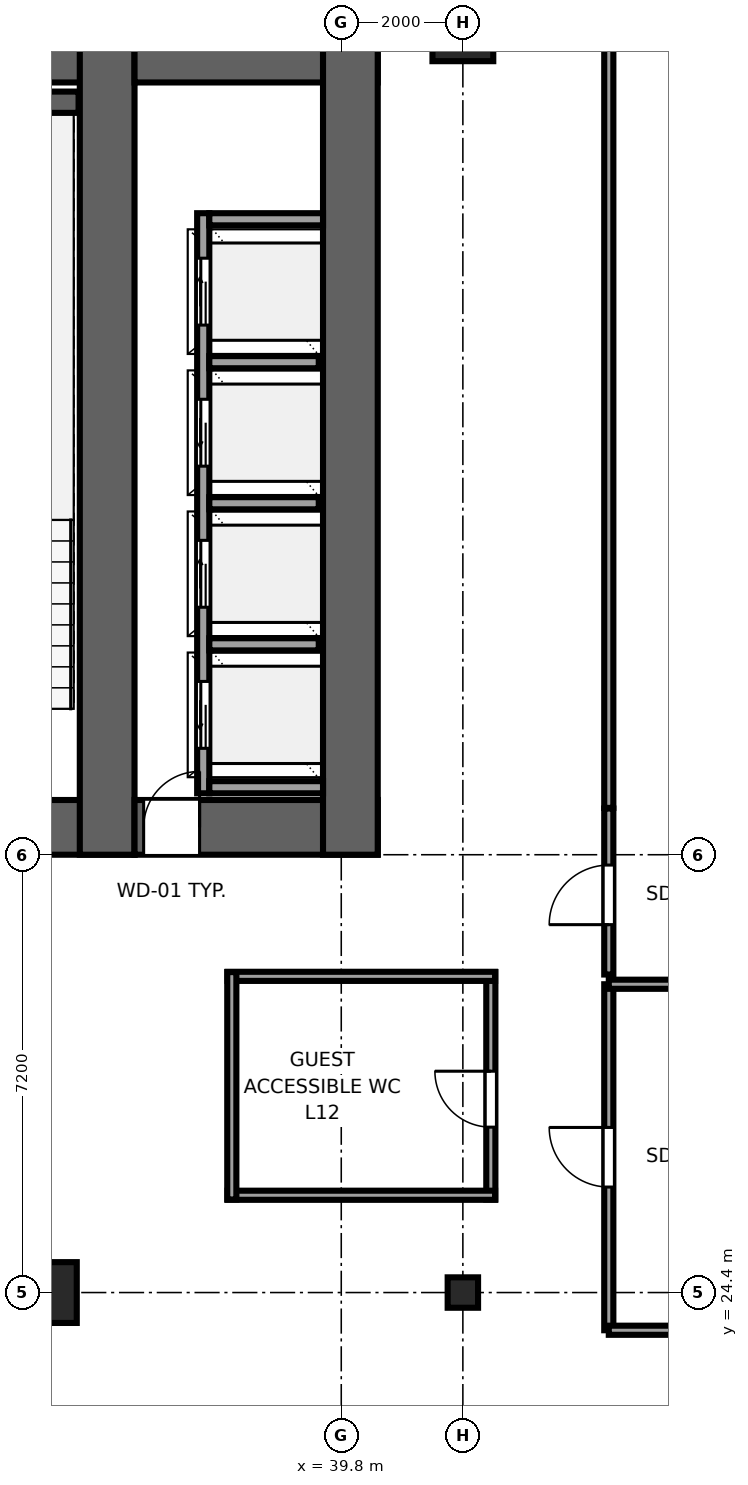
"""IFC4 building model, lengths in metres.
Left out: names, types, materials, properties, quantities, classifications, styles, units other than length and angle.
Written with IfcOpenShell. Run it as: python <this file> out.ifc"""

import sys

from ifc_helpers import new_model, si_unit, direction, frame, frame_2d, origin, origin_2d, place, context, subcontext, project, spatial, rectangle, i_section, extrude, source, transform, mapped, element, fill, save


model = new_model("IFC4")
c1 = context("Model", 3, precision=1e-05, world=origin(), true_north=direction((0.0, 1.0)))
c2 = subcontext(c1, "Body", "Model", "MODEL_VIEW")
j1 = project(units=[si_unit("LENGTHUNIT", "METRE"), si_unit("PLANEANGLEUNIT", "RADIAN")], contexts=[c1])
p1 = place(None, origin())
s1 = spatial("IfcSite", under=j1, at=p1, CompositionType="ELEMENT")
p2 = place(p1, origin())
s2 = spatial("IfcBuilding", under=s1, at=p2, CompositionType="ELEMENT")
p3 = place(p2, frame((0.0, 0.0, 53.3)))
s3 = spatial("IfcBuildingStorey", under=s2, at=p3, CompositionType="ELEMENT", Elevation=53.3)
p4 = place(p3, frame((9.6, 32.05, 0.0), z_axis=(0.0, 0.0, 1.0), x_axis=(1.0, 0.0, 0.0)))
e1 = element("IfcWall", 1, at=p4, inside=s3, PredefinedType="SHEAR", context=c2, shape_type="SweptSolid", body=[
    extrude(rectangle(XDim=26.8, YDim=0.9, at=frame_2d((13.4, 0.0))), origin(), (0.0, 0.0, 1.0), 3.55),
])
p5 = place(p4, frame((7.85, 0.0, 0.0), z_axis=(0.0, 0.0, 1.0), x_axis=(-1.0, 0.0, 0.0)))
e2 = element("IfcOpeningElement", 2, at=p5, cuts=e1, PredefinedType="OPENING", context=c2, shape_type="SweptSolid", body=[
    extrude(rectangle(XDim=1.5, YDim=2.04, at=frame_2d((0.75, 1.02))), frame((0.0, 0.46, 0.0), z_axis=(0.0, -1.0, 0.0), x_axis=(1.0, 0.0, 0.0)), (0.0, 0.0, 1.0), 0.92),
])
p6 = place(p4, frame((14.15, 0.0, 0.0), z_axis=(0.0, 0.0, 1.0), x_axis=(-1.0, 0.0, 0.0)))
e3 = element("IfcOpeningElement", 3, at=p6, cuts=e1, PredefinedType="OPENING", context=c2, shape_type="SweptSolid", body=[
    extrude(rectangle(XDim=1.5, YDim=2.04, at=frame_2d((0.75, 1.02))), frame((0.0, 0.46, 0.0), z_axis=(0.0, -1.0, 0.0), x_axis=(1.0, 0.0, 0.0)), (0.0, 0.0, 1.0), 0.92),
])
p7 = place(p4, frame((20.45, 0.0, 0.0), z_axis=(0.0, 0.0, 1.0), x_axis=(-1.0, 0.0, 0.0)))
e4 = element("IfcOpeningElement", 4, at=p7, cuts=e1, PredefinedType="OPENING", context=c2, shape_type="SweptSolid", body=[
    extrude(rectangle(XDim=1.5, YDim=2.04, at=frame_2d((0.75, 1.02))), frame((0.0, 0.46, 0.0), z_axis=(0.0, -1.0, 0.0), x_axis=(1.0, 0.0, 0.0)), (0.0, 0.0, 1.0), 0.92),
])
p8 = place(p3, frame((9.6, 44.75, 0.0), z_axis=(0.0, 0.0, 1.0), x_axis=(1.0, 0.0, 0.0)))
e5 = element("IfcWall", 5, at=p8, inside=s3, PredefinedType="SHEAR", context=c2, shape_type="SweptSolid", body=[
    extrude(rectangle(XDim=26.8, YDim=0.9, at=frame_2d((13.4, 0.0))), origin(), (0.0, 0.0, 1.0), 3.55),
])
p9 = place(p3, frame((35.95, 31.6, 0.0), z_axis=(0.0, 0.0, 1.0), x_axis=(0.0, 1.0, 0.0)))
e6 = element("IfcWall", 6, at=p9, inside=s3, PredefinedType="SHEAR", context=c2, shape_type="SweptSolid", body=[
    extrude(rectangle(XDim=13.6, YDim=0.9, at=frame_2d((6.8, 0.0))), origin(), (0.0, 0.0, 1.0), 3.55),
])
p10 = place(p3, frame((36.4, 32.05, 0.0), z_axis=(0.0, 0.0, 1.0), x_axis=(1.0, 0.0, 0.0)))
e7 = element("IfcWall", 7, at=p10, inside=s3, PredefinedType="SHEAR", context=c2, shape_type="SweptSolid", body=[
    extrude(rectangle(XDim=4.0, YDim=0.9, at=frame_2d((2.0, 0.0))), origin(), (0.0, 0.0, 1.0), 3.55),
])
p11 = place(p10, frame((1.07, 0.0, 0.0), z_axis=(0.0, 0.0, 1.0), x_axis=(-1.0, 0.0, 0.0)))
e8 = element("IfcOpeningElement", 8, at=p11, cuts=e7, PredefinedType="OPENING", context=c2, shape_type="SweptSolid", body=[
    extrude(rectangle(XDim=0.92, YDim=2.01, at=frame_2d((0.46, 1.005))), frame((0.0, 0.46, 0.0), z_axis=(0.0, -1.0, 0.0), x_axis=(1.0, 0.0, 0.0)), (0.0, 0.0, 1.0), 0.92),
])
p12 = place(p3, frame((36.4, 44.75, 0.0), z_axis=(0.0, 0.0, 1.0), x_axis=(1.0, 0.0, 0.0)))
e9 = element("IfcWall", 9, at=p12, inside=s3, PredefinedType="SHEAR", context=c2, shape_type="SweptSolid", body=[
    extrude(rectangle(XDim=4.0, YDim=0.9, at=frame_2d((2.0, 0.0))), origin(), (0.0, 0.0, 1.0), 3.55),
])
p13 = place(p3, frame((39.95, 31.6, 0.0), z_axis=(0.0, 0.0, 1.0), x_axis=(0.0, 1.0, 0.0)))
e10 = element("IfcWall", 10, at=p13, inside=s3, PredefinedType="SHEAR", context=c2, shape_type="SweptSolid", body=[
    extrude(rectangle(XDim=13.6, YDim=0.9, at=frame_2d((6.8, 0.0))), origin(), (0.0, 0.0, 1.0), 3.55),
])
p14 = place(p3, frame((31.88, 43.975, 0.0), z_axis=(0.0, 0.0, 1.0), x_axis=(1.0, 0.0, 0.0)))
e11 = element("IfcWall", 11, at=p14, inside=s3, PredefinedType="SHEAR", context=c2, shape_type="SweptSolid", body=[
    extrude(rectangle(XDim=3.6, YDim=0.35, at=frame_2d((1.8, 0.0))), origin(), (0.0, 0.0, 1.0), 3.55),
])
m1 = source(origin(), c2, "Body", "SweptSolid", [
    extrude(rectangle(XDim=1.0, YDim=1.0, at=origin_2d()), origin(), (0.0, 0.0, 1.0), 3.55),
])
p15 = place(p3, frame((34.95, 24.4, 0.0), z_axis=(0.0, 0.0, 1.0), x_axis=(1.0, 0.0, 0.0)))
e12 = element("IfcColumn", 12, at=p15, inside=s3, PredefinedType="COLUMN", context=c2, shape_type="MappedRepresentation", body=[
    mapped(m1, transform((0.0, 0.0, 0.0), x_axis=(1.0, 0.0, 0.0), y_axis=(0.0, 1.0, 0.0), z_axis=(0.0, 0.0, 1.0), scale=1.0)),
])
m2 = source(origin(), c2, "Body", "SweptSolid", [
    extrude(i_section(OverallWidth=0.5, OverallDepth=0.5, WebThickness=0.028, FlangeThickness=0.045, at=origin_2d()), origin(), (0.0, 0.0, 1.0), 3.55),
])
p16 = place(p3, frame((41.8, 24.4, 0.0), z_axis=(0.0, 0.0, 1.0), x_axis=(1.0, 0.0, 0.0)))
e13 = element("IfcColumn", 13, at=p16, inside=s3, PredefinedType="COLUMN", context=c2, shape_type="MappedRepresentation", body=[
    mapped(m2, transform((0.0, 0.0, 0.0), x_axis=(1.0, 0.0, 0.0), y_axis=(0.0, 1.0, 0.0), z_axis=(0.0, 0.0, 1.0), scale=1.0)),
])
p17 = place(p3, frame((41.8, 45.15, 0.0), z_axis=(0.0, 0.0, 1.0), x_axis=(1.0, 0.0, 0.0)))
e14 = element("IfcColumn", 14, at=p17, inside=s3, PredefinedType="COLUMN", context=c2, shape_type="MappedRepresentation", body=[
    mapped(m1, transform((0.0, 0.0, 0.0), x_axis=(1.0, 0.0, 0.0), y_axis=(0.0, 1.0, 0.0), z_axis=(0.0, 0.0, 1.0), scale=1.0)),
])
p18 = place(p3, frame((37.53, 32.61, 0.0), z_axis=(0.0, 0.0, 1.0), x_axis=(0.0, 1.0, 0.0)))
e15 = element("IfcWall", 15, at=p18, inside=s3, PredefinedType="SOLIDWALL", context=c2, shape_type="SweptSolid", body=[
    extrude(rectangle(XDim=9.54, YDim=0.2, at=frame_2d((4.77, 0.0))), origin(), (0.0, 0.0, 1.0), 3.37),
])
p19 = place(p18, frame((0.74, 0.0, 0.0)))
e16 = element("IfcOpeningElement", 16, at=p19, cuts=e15, PredefinedType="OPENING", context=c2, shape_type="SweptSolid", body=[
    extrude(rectangle(XDim=1.1, YDim=2.12, at=frame_2d((0.55, 1.06))), frame((0.0, 0.11, 0.0), z_axis=(0.0, -1.0, 0.0), x_axis=(1.0, 0.0, 0.0)), (0.0, 0.0, 1.0), 0.22),
])
p20 = place(p18, frame((3.06, 0.0, 0.0)))
e17 = element("IfcOpeningElement", 17, at=p20, cuts=e15, PredefinedType="OPENING", context=c2, shape_type="SweptSolid", body=[
    extrude(rectangle(XDim=1.1, YDim=2.12, at=frame_2d((0.55, 1.06))), frame((0.0, 0.11, 0.0), z_axis=(0.0, -1.0, 0.0), x_axis=(1.0, 0.0, 0.0)), (0.0, 0.0, 1.0), 0.22),
])
p21 = place(p18, frame((5.38, 0.0, 0.0)))
e18 = element("IfcOpeningElement", 18, at=p21, cuts=e15, PredefinedType="OPENING", context=c2, shape_type="SweptSolid", body=[
    extrude(rectangle(XDim=1.1, YDim=2.12, at=frame_2d((0.55, 1.06))), frame((0.0, 0.11, 0.0), z_axis=(0.0, -1.0, 0.0), x_axis=(1.0, 0.0, 0.0)), (0.0, 0.0, 1.0), 0.22),
])
p22 = place(p18, frame((7.7, 0.0, 0.0)))
e19 = element("IfcOpeningElement", 19, at=p22, cuts=e15, PredefinedType="OPENING", context=c2, shape_type="SweptSolid", body=[
    extrude(rectangle(XDim=1.1, YDim=2.12, at=frame_2d((0.55, 1.06))), frame((0.0, 0.11, 0.0), z_axis=(0.0, -1.0, 0.0), x_axis=(1.0, 0.0, 0.0)), (0.0, 0.0, 1.0), 0.22),
])
for number, where, z_axis, x_axis in (
    (20, (37.63, 32.71, 0.0), (0.0, 0.0, 1.0), (1.0, 0.0, 0.0)),
    (21, (37.63, 42.05, 0.0), (0.0, 0.0, 1.0), (1.0, 0.0, 0.0)),
):
    element("IfcWall", number, at=place(p3, frame(where, z_axis=z_axis, x_axis=x_axis)), inside=s3, PredefinedType="SOLIDWALL", context=c2, shape_type="SweptSolid", body=[
        extrude(rectangle(XDim=1.87, YDim=0.2, at=frame_2d((0.935, 0.0))), origin(), (0.0, 0.0, 1.0), 3.37),
    ])
for number, where, z_axis, x_axis in (
    (22, (37.63, 35.06, 0.0), (0.0, 0.0, 1.0), (1.0, 0.0, 0.0)),
    (23, (37.63, 37.38, 0.0), (0.0, 0.0, 1.0), (1.0, 0.0, 0.0)),
    (24, (37.63, 39.7, 0.0), (0.0, 0.0, 1.0), (1.0, 0.0, 0.0)),
):
    element("IfcWall", number, at=place(p3, frame(where, z_axis=z_axis, x_axis=x_axis)), inside=s3, PredefinedType="SOLIDWALL", context=c2, shape_type="SweptSolid", body=[
        extrude(rectangle(XDim=1.8, YDim=0.2, at=frame_2d((0.9, 0.0))), origin(), (0.0, 0.0, 1.0), 3.37),
    ])
p23 = place(p3, frame((44.2, 23.78, 0.0), z_axis=(0.0, 0.0, 1.0), x_axis=(0.0, 1.0, 0.0)))
e25 = element("IfcWall", 25, at=p23, inside=s3, PredefinedType="PARTITIONING", context=c2, shape_type="SweptSolid", body=[
    extrude(rectangle(XDim=5.69, YDim=0.15, at=frame_2d((2.845, 0.0))), origin(), (0.0, 0.0, 1.0), 3.37),
])
p24 = place(p23, frame((2.355, 0.0, 0.0)))
e26 = element("IfcOpeningElement", 26, at=p24, cuts=e25, PredefinedType="OPENING", context=c2, shape_type="SweptSolid", body=[
    extrude(rectangle(XDim=0.98, YDim=2.12, at=frame_2d((0.49, 1.06))), frame((0.0, 0.085, 0.0), z_axis=(0.0, -1.0, 0.0), x_axis=(1.0, 0.0, 0.0)), (0.0, 0.0, 1.0), 0.17),
])
p25 = place(p3, frame((44.2, 23.78, 0.0), z_axis=(0.0, 0.0, 1.0), x_axis=(1.0, 0.0, 0.0)))
e27 = element("IfcWall", 27, at=p25, inside=s3, PredefinedType="PARTITIONING", context=c2, shape_type="SweptSolid", body=[
    extrude(rectangle(XDim=12.395, YDim=0.15, at=frame_2d((6.198, 0.0))), origin(), (0.0, 0.0, 1.0), 3.37),
])
p26 = place(p3, frame((44.2, 29.47, 0.0), z_axis=(0.0, 0.0, 1.0), x_axis=(1.0, 0.0, 0.0)))
e28 = element("IfcWall", 28, at=p26, inside=s3, PredefinedType="PARTITIONING", context=c2, shape_type="SweptSolid", body=[
    extrude(rectangle(XDim=10.03, YDim=0.15, at=frame_2d((5.015, 0.0))), origin(), (0.0, 0.0, 1.0), 3.37),
])
p27 = place(p3, frame((44.2, 29.63, 0.0), z_axis=(0.0, 0.0, 1.0), x_axis=(0.0, 1.0, 0.0)))
e29 = element("IfcWall", 29, at=p27, inside=s3, PredefinedType="PARTITIONING", context=c2, shape_type="SweptSolid", body=[
    extrude(rectangle(XDim=2.73, YDim=0.15, at=frame_2d((1.365, 0.0))), origin(), (0.0, 0.0, 1.0), 3.37),
])
p28 = place(p27, frame((0.82, 0.0, 0.0)))
e30 = element("IfcOpeningElement", 30, at=p28, cuts=e29, PredefinedType="OPENING", context=c2, shape_type="SweptSolid", body=[
    extrude(rectangle(XDim=0.98, YDim=2.12, at=frame_2d((0.49, 1.06))), frame((0.0, 0.085, 0.0), z_axis=(0.0, -1.0, 0.0), x_axis=(1.0, 0.0, 0.0)), (0.0, 0.0, 1.0), 0.17),
])
p29 = place(p3, frame((44.2, 32.37, 0.0), z_axis=(0.0, 0.0, 1.0), x_axis=(0.0, 1.0, 0.0)))
e31 = element("IfcWall", 31, at=p29, inside=s3, PredefinedType="PARTITIONING", context=c2, shape_type="SweptSolid", body=[
    extrude(rectangle(XDim=13.225, YDim=0.15, at=frame_2d((6.612, 0.0))), origin(), (0.0, 0.0, 1.0), 3.37),
])
p30 = place(p3, frame((42.26, 25.93, 0.0), z_axis=(0.0, 0.0, 1.0), x_axis=(0.0, 1.0, 0.0)))
e32 = element("IfcWall", 32, at=p30, inside=s3, PredefinedType="PARTITIONING", context=c2, shape_type="SweptSolid", body=[
    extrude(rectangle(XDim=3.74, YDim=0.15, at=frame_2d((1.87, 0.0))), origin(), (0.0, 0.0, 1.0), 3.37),
])
p31 = place(p30, frame((1.19, 0.0, 0.0)))
e33 = element("IfcOpeningElement", 33, at=p31, cuts=e32, PredefinedType="OPENING", context=c2, shape_type="SweptSolid", body=[
    extrude(rectangle(XDim=0.92, YDim=2.01, at=frame_2d((0.46, 1.005))), frame((0.0, 0.085, 0.0), z_axis=(0.0, -1.0, 0.0), x_axis=(1.0, 0.0, 0.0)), (0.0, 0.0, 1.0), 0.17),
])
for number, where, z_axis, x_axis in (
    (34, (37.93, 26.0, 0.0), (0.0, 0.0, 1.0), (1.0, 0.0, 0.0)),
    (35, (37.93, 29.6, 0.0), (0.0, 0.0, 1.0), (1.0, 0.0, 0.0)),
):
    element("IfcWall", number, at=place(p3, frame(where, z_axis=z_axis, x_axis=x_axis)), inside=s3, PredefinedType="PARTITIONING", context=c2, shape_type="SweptSolid", body=[
        extrude(rectangle(XDim=4.4, YDim=0.15, at=frame_2d((2.2, 0.0))), origin(), (0.0, 0.0, 1.0), 3.37),
    ])
p32 = place(p3, frame((38.0, 25.93, 0.0), z_axis=(0.0, 0.0, 1.0), x_axis=(0.0, 1.0, 0.0)))
e36 = element("IfcWall", 36, at=p32, inside=s3, PredefinedType="PARTITIONING", context=c2, shape_type="SweptSolid", body=[
    extrude(rectangle(XDim=3.74, YDim=0.15, at=frame_2d((1.87, 0.0))), origin(), (0.0, 0.0, 1.0), 3.37),
])
m3 = source(origin(), c2, "Body", "SweptSolid", [
    extrude(rectangle(XDim=0.92, YDim=2.01, at=frame_2d((0.46, 1.005))), frame((0.0, 0.025, 0.0), z_axis=(0.0, -1.0, 0.0), x_axis=(1.0, 0.0, 0.0)), (0.0, 0.0, 1.0), 0.05),
])
p33 = place(p11, origin())
e37 = element("IfcDoor", 37, at=p33, inside=s3, OperationType="SINGLE_SWING_RIGHT", PredefinedType="DOOR", context=c2, shape_type="MappedRepresentation", body=[
    mapped(m3, transform((0.0, 0.0, 0.0), x_axis=(1.0, 0.0, 0.0), y_axis=(0.0, 1.0, 0.0), z_axis=(0.0, 0.0, 1.0), scale=1.0)),
])
fill(e8, e37)
m4 = source(origin(), c2, "Body", "SweptSolid", [
    extrude(rectangle(XDim=1.1, YDim=2.12, at=frame_2d((0.55, 1.06))), frame((0.0, 0.025, 0.0), z_axis=(0.0, -1.0, 0.0), x_axis=(1.0, 0.0, 0.0)), (0.0, 0.0, 1.0), 0.05),
])
p34 = place(p19, origin())
e38 = element("IfcDoor", 38, at=p34, inside=s3, OperationType="SLIDING_TO_LEFT", PredefinedType="DOOR", context=c2, shape_type="MappedRepresentation", body=[
    mapped(m4, transform((0.0, 0.0, 0.0), x_axis=(1.0, 0.0, 0.0), y_axis=(0.0, 1.0, 0.0), z_axis=(0.0, 0.0, 1.0), scale=1.0)),
])
fill(e16, e38)
p35 = place(p20, origin())
e39 = element("IfcDoor", 39, at=p35, inside=s3, OperationType="SLIDING_TO_RIGHT", PredefinedType="DOOR", context=c2, shape_type="MappedRepresentation", body=[
    mapped(m4, transform((0.0, 0.0, 0.0), x_axis=(1.0, 0.0, 0.0), y_axis=(0.0, 1.0, 0.0), z_axis=(0.0, 0.0, 1.0), scale=1.0)),
])
fill(e17, e39)
p36 = place(p21, origin())
e40 = element("IfcDoor", 40, at=p36, inside=s3, OperationType="SLIDING_TO_LEFT", PredefinedType="DOOR", context=c2, shape_type="MappedRepresentation", body=[
    mapped(m4, transform((0.0, 0.0, 0.0), x_axis=(1.0, 0.0, 0.0), y_axis=(0.0, 1.0, 0.0), z_axis=(0.0, 0.0, 1.0), scale=1.0)),
])
fill(e18, e40)
p37 = place(p22, origin())
e41 = element("IfcDoor", 41, at=p37, inside=s3, OperationType="SLIDING_TO_RIGHT", PredefinedType="DOOR", context=c2, shape_type="MappedRepresentation", body=[
    mapped(m4, transform((0.0, 0.0, 0.0), x_axis=(1.0, 0.0, 0.0), y_axis=(0.0, 1.0, 0.0), z_axis=(0.0, 0.0, 1.0), scale=1.0)),
])
fill(e19, e41)
m5 = source(origin(), c2, "Body", "SweptSolid", [
    extrude(rectangle(XDim=0.98, YDim=2.12, at=frame_2d((0.49, 1.06))), frame((0.0, 0.025, 0.0), z_axis=(0.0, -1.0, 0.0), x_axis=(1.0, 0.0, 0.0)), (0.0, 0.0, 1.0), 0.05),
])
p38 = place(p24, origin())
e42 = element("IfcDoor", 42, at=p38, inside=s3, OperationType="SINGLE_SWING_RIGHT", PredefinedType="DOOR", context=c2, shape_type="MappedRepresentation", body=[
    mapped(m5, transform((0.0, 0.0, 0.0), x_axis=(1.0, 0.0, 0.0), y_axis=(0.0, 1.0, 0.0), z_axis=(0.0, 0.0, 1.0), scale=1.0)),
])
fill(e26, e42)
p39 = place(p28, origin())
e43 = element("IfcDoor", 43, at=p39, inside=s3, OperationType="SINGLE_SWING_LEFT", PredefinedType="DOOR", context=c2, shape_type="MappedRepresentation", body=[
    mapped(m5, transform((0.0, 0.0, 0.0), x_axis=(1.0, 0.0, 0.0), y_axis=(0.0, 1.0, 0.0), z_axis=(0.0, 0.0, 1.0), scale=1.0)),
])
fill(e30, e43)
p40 = place(p31, origin())
e44 = element("IfcDoor", 44, at=p40, inside=s3, OperationType="SINGLE_SWING_RIGHT", PredefinedType="DOOR", context=c2, shape_type="MappedRepresentation", body=[
    mapped(m3, transform((0.0, 0.0, 0.0), x_axis=(1.0, 0.0, 0.0), y_axis=(0.0, 1.0, 0.0), z_axis=(0.0, 0.0, 1.0), scale=1.0)),
])
fill(e33, e44)
save(model, sys.argv[1])
